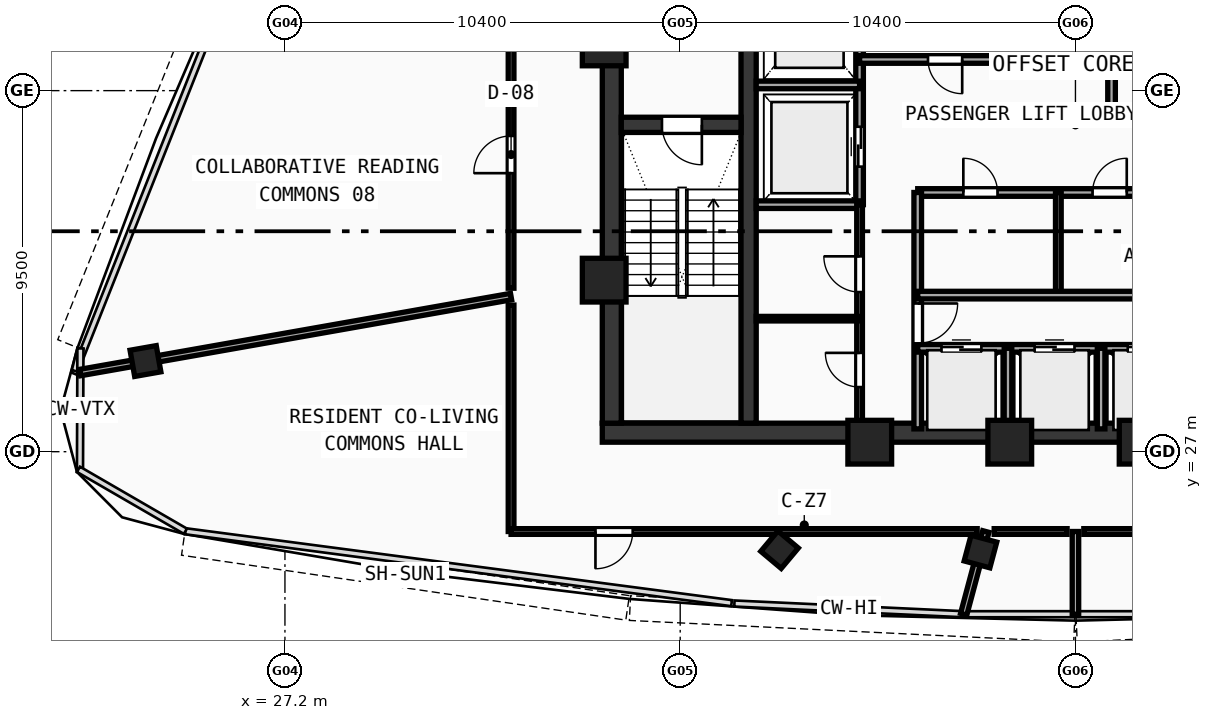
"""IFC4 building model, lengths in metres.
Left out: names, types, materials, properties, quantities, classifications, styles, units other than length and angle.
Written with IfcOpenShell. Run it as: python <this file> out.ifc"""

import sys

from ifc_helpers import new_model, si_unit, direction, frame, frame_2d, origin, origin_with_axes, origin_2d, place, context, subcontext, project, spatial, rectangle, hollow_rectangle, extrude, source, transform, mapped, element, fill, save


model = new_model("IFC4")
c1 = context("Model", 3, precision=1e-05, world=origin(), true_north=direction((0.0, 1.0)))
c2 = subcontext(c1, "Body", "Model", "MODEL_VIEW")
j1 = project(units=[si_unit("LENGTHUNIT", "METRE"), si_unit("PLANEANGLEUNIT", "RADIAN")], contexts=[c1])
p1 = place(None, origin())
s1 = spatial("IfcSite", under=j1, at=p1, CompositionType="ELEMENT")
p2 = place(p1, origin())
s2 = spatial("IfcBuilding", under=s1, at=p2, CompositionType="ELEMENT")
p3 = place(p2, frame((0.0, 0.0, 363.01)))
s3 = spatial("IfcBuildingStorey", under=s2, at=p3, CompositionType="ELEMENT", Elevation=363.01)
p4 = place(p3, frame((35.55, 27.5, 0.0), z_axis=(0.0, 0.0, 1.0), x_axis=(1.0, 0.0, 0.0)))
e1 = element("IfcWall", 1, at=p4, inside=s3, PredefinedType="SHEAR", context=c2, shape_type="SweptSolid", body=[
    extrude(rectangle(XDim=24.9, YDim=0.5, at=frame_2d((12.45, 0.0))), origin(), (0.0, 0.0, 1.0), 3.47),
])
p5 = place(p3, frame((35.8, 27.75, 0.0), z_axis=(0.0, 0.0, 1.0), x_axis=(0.0, 1.0, 0.0)))
e2 = element("IfcWall", 2, at=p5, inside=s3, PredefinedType="SHEAR", context=c2, shape_type="SweptSolid", body=[
    extrude(rectangle(XDim=12.2, YDim=0.5, at=frame_2d((6.1, 0.0))), origin(), (0.0, 0.0, 1.0), 3.47),
])
p6 = place(p3, frame((39.4, 27.75, 0.0), z_axis=(0.0, 0.0, 1.0), x_axis=(0.0, 1.0, 0.0)))
e3 = element("IfcWall", 3, at=p6, inside=s3, PredefinedType="SHEAR", context=c2, shape_type="SweptSolid", body=[
    extrude(rectangle(XDim=12.2, YDim=0.4, at=frame_2d((6.1, 0.0))), origin(), (0.0, 0.0, 1.0), 3.47),
])
p7 = place(p6, frame((10.0, 0.0, 0.0)))
e4 = element("IfcOpeningElement", 4, at=p7, cuts=e3, PredefinedType="OPENING", context=c2, shape_type="SweptSolid", body=[
    extrude(rectangle(XDim=1.1, YDim=2.1, at=frame_2d((0.55, 1.05))), frame((0.0, 0.21, 0.0), z_axis=(0.0, -1.0, 0.0), x_axis=(1.0, 0.0, 0.0)), (0.0, 0.0, 1.0), 0.42),
])
p8 = place(p3, frame((36.05, 35.6, 0.0), z_axis=(0.0, 0.0, 1.0), x_axis=(1.0, 0.0, 0.0)))
e5 = element("IfcWall", 5, at=p8, inside=s3, PredefinedType="SHEAR", context=c2, shape_type="SweptSolid", body=[
    extrude(rectangle(XDim=3.15, YDim=0.4, at=frame_2d((1.575, 0.0))), origin(), (0.0, 0.0, 1.0), 3.47),
])
p9 = place(p8, frame((1.07, 0.0, 0.0)))
e6 = element("IfcOpeningElement", 6, at=p9, cuts=e5, PredefinedType="OPENING", context=c2, shape_type="SweptSolid", body=[
    extrude(rectangle(XDim=1.05, YDim=2.1, at=frame_2d((0.525, 1.05))), frame((0.0, 0.21, 0.0), z_axis=(0.0, -1.0, 0.0), x_axis=(1.0, 0.0, 0.0)), (0.0, 0.0, 1.0), 0.42),
])
m1 = source(origin(), c2, "Body", "SweptSolid", [
    extrude(hollow_rectangle(XDim=1.15, YDim=1.15, WallThickness=0.048, at=origin_2d()), origin(), (0.0, 0.0, 1.0), 3.73),
])
for number, where, z_axis, x_axis in (
    (7, (42.588, 27.25, -0.26), (0.0, 0.0, 1.0), (1.0, 0.0, 0.0)),
    (8, (46.272, 27.25, -0.26), (0.0, 0.0, 1.0), (1.0, 0.0, 0.0)),
    (9, (49.729, 27.25, -0.26), (0.0, 0.0, 1.0), (1.0, 0.0, 0.0)),
    (10, (35.6, 37.729, -0.26), (0.0, 0.0, 1.0), (1.0, 0.0, 0.0)),
    (11, (35.6, 31.513, -0.26), (0.0, 0.0, 1.0), (1.0, 0.0, 0.0)),
):
    element("IfcColumn", number, at=place(p3, frame(where, z_axis=z_axis, x_axis=x_axis)), inside=s3, PredefinedType="COLUMN", context=c2, shape_type="MappedRepresentation", body=[
        mapped(m1, transform((0.0, 0.0, 0.0), scale=1.0)),
    ])
m2 = source(origin(), c2, "Body", "SweptSolid", [
    extrude(hollow_rectangle(XDim=0.7, YDim=0.7, WallThickness=0.026, at=origin_2d()), origin(), (0.0, 0.0, 1.0), 3.73),
])
for number, where, z_axis, x_axis in (
    (12, (40.215, 24.422, -0.26), (0.0, 0.0, 1.0), (0.766, -0.643, 0.0)),
    (13, (45.501, 24.373, -0.26), (0.0, 0.0, 1.0), (0.966, -0.259, 0.0)),
    (14, (23.53, 29.385, -0.26), (0.0, 0.0, 1.0), (0.174, -0.985, 0.0)),
):
    element("IfcColumn", number, at=place(p3, frame(where, z_axis=z_axis, x_axis=x_axis)), inside=s3, PredefinedType="COLUMN", context=c2, shape_type="MappedRepresentation", body=[
        mapped(m2, transform((0.0, 0.0, 0.0), scale=1.0)),
    ])
p10 = place(p3, frame((42.32, 33.5, 0.0), z_axis=(0.0, 0.0, 1.0), x_axis=(0.0, 1.0, 0.0)))
e15 = element("IfcWall", 15, at=p10, inside=s3, PredefinedType="SOLIDWALL", context=c2, shape_type="SweptSolid", body=[
    extrude(rectangle(XDim=6.45, YDim=0.2, at=frame_2d((3.225, 0.0))), origin(), (0.0, 0.0, 1.0), 3.47),
])
p11 = place(p10, frame((1.0, 0.0, 0.0)))
e16 = element("IfcOpeningElement", 16, at=p11, cuts=e15, PredefinedType="OPENING", context=c2, shape_type="SweptSolid", body=[
    extrude(rectangle(XDim=1.05, YDim=2.1, at=frame_2d((0.525, 1.05))), frame((0.0, 0.11, 0.0), z_axis=(0.0, -1.0, 0.0), x_axis=(1.0, 0.0, 0.0)), (0.0, 0.0, 1.0), 0.22),
])
for number, where, z_axis, x_axis in (
    (17, (39.6, 36.65, 0.0), (0.0, 0.0, 1.0), (1.0, 0.0, 0.0)),
    (18, (39.6, 33.5, 0.0), (0.0, 0.0, 1.0), (1.0, 0.0, 0.0)),
):
    element("IfcWall", number, at=place(p3, frame(where, z_axis=z_axis, x_axis=x_axis)), inside=s3, PredefinedType="SOLIDWALL", context=c2, shape_type="SweptSolid", body=[
        extrude(rectangle(XDim=2.72, YDim=0.2, at=frame_2d((1.36, 0.0))), origin(), (0.0, 0.0, 1.0), 3.47),
    ])
p12 = place(p3, frame((42.32, 37.32, 0.0), z_axis=(0.0, 0.0, 1.0), x_axis=(1.0, 0.0, 0.0)))
e19 = element("IfcWall", 19, at=p12, inside=s3, PredefinedType="SOLIDWALL", context=c2, shape_type="SweptSolid", body=[
    extrude(rectangle(XDim=4.73, YDim=0.2, at=frame_2d((2.365, 0.0))), origin(), (0.0, 0.0, 1.0), 3.47),
])
p13 = place(p12, frame((1.8, 0.0, 0.0)))
e20 = element("IfcOpeningElement", 20, at=p13, cuts=e19, PredefinedType="OPENING", context=c2, shape_type="SweptSolid", body=[
    extrude(rectangle(XDim=0.9, YDim=2.1, at=frame_2d((0.45, 1.05))), frame((0.0, 0.11, 0.0), z_axis=(0.0, -1.0, 0.0), x_axis=(1.0, 0.0, 0.0)), (0.0, 0.0, 1.0), 0.22),
])
p14 = place(p3, frame((48.95, 35.85, 0.0), z_axis=(0.0, 0.0, 1.0), x_axis=(1.0, 0.0, 0.0)))
e21 = element("IfcWall", 21, at=p14, inside=s3, PredefinedType="SOLIDWALL", context=c2, shape_type="SweptSolid", body=[
    extrude(rectangle(XDim=4.73, YDim=0.2, at=frame_2d((2.365, 0.0))), origin(), (0.0, 0.0, 1.0), 3.47),
])
p15 = place(p14, frame((1.8, 0.0, 0.0)))
e22 = element("IfcOpeningElement", 22, at=p15, cuts=e21, PredefinedType="OPENING", context=c2, shape_type="SweptSolid", body=[
    extrude(rectangle(XDim=0.9, YDim=2.1, at=frame_2d((0.45, 1.05))), frame((0.0, 0.11, 0.0), z_axis=(0.0, -1.0, 0.0), x_axis=(1.0, 0.0, 0.0)), (0.0, 0.0, 1.0), 0.22),
])
p16 = place(p3, frame((47.05, 37.32, 0.0), z_axis=(0.0, 0.0, 1.0), x_axis=(0.0, 1.0, 0.0)))
e23 = element("IfcWall", 23, at=p16, inside=s3, PredefinedType="SOLIDWALL", context=c2, shape_type="SweptSolid", body=[
    extrude(rectangle(XDim=2.63, YDim=0.2, at=frame_2d((1.315, 0.0))), origin(), (0.0, 0.0, 1.0), 3.47),
])
p17 = place(p3, frame((48.95, 35.85, 0.0), z_axis=(0.0, 0.0, 1.0), x_axis=(0.0, 1.0, 0.0)))
e24 = element("IfcWall", 24, at=p17, inside=s3, PredefinedType="SOLIDWALL", context=c2, shape_type="SweptSolid", body=[
    extrude(rectangle(XDim=4.1, YDim=0.2, at=frame_2d((2.05, 0.0))), origin(), (0.0, 0.0, 1.0), 3.47),
])
p18 = place(p3, frame((43.85, 33.82, 0.0), z_axis=(0.0, 0.0, 1.0), x_axis=(1.0, 0.0, 0.0)))
e25 = element("IfcWall", 25, at=p18, inside=s3, PredefinedType="SOLIDWALL", context=c2, shape_type="SweptSolid", body=[
    extrude(rectangle(XDim=9.83, YDim=0.2, at=frame_2d((4.915, 0.0))), origin(), (0.0, 0.0, 1.0), 3.47),
])
p19 = place(p18, frame((1.2, 0.0, 0.0)))
e26 = element("IfcOpeningElement", 26, at=p19, cuts=e25, PredefinedType="OPENING", context=c2, shape_type="SweptSolid", body=[
    extrude(rectangle(XDim=0.9, YDim=2.1, at=frame_2d((0.45, 1.05))), frame((0.0, 0.11, 0.0), z_axis=(0.0, -1.0, 0.0), x_axis=(1.0, 0.0, 0.0)), (0.0, 0.0, 1.0), 0.22),
])
p20 = place(p18, frame((4.6, 0.0, 0.0)))
e27 = element("IfcOpeningElement", 27, at=p20, cuts=e25, PredefinedType="OPENING", context=c2, shape_type="SweptSolid", body=[
    extrude(rectangle(XDim=0.9, YDim=2.1, at=frame_2d((0.45, 1.05))), frame((0.0, 0.11, 0.0), z_axis=(0.0, -1.0, 0.0), x_axis=(1.0, 0.0, 0.0)), (0.0, 0.0, 1.0), 0.22),
])
p21 = place(p3, frame((43.85, 27.6, 0.0), z_axis=(0.0, 0.0, 1.0), x_axis=(0.0, 1.0, 0.0)))
e28 = element("IfcWall", 28, at=p21, inside=s3, PredefinedType="SOLIDWALL", context=c2, shape_type="SweptSolid", body=[
    extrude(rectangle(XDim=6.22, YDim=0.2, at=frame_2d((3.11, 0.0))), origin(), (0.0, 0.0, 1.0), 3.47),
])
p22 = place(p21, frame((2.25, 0.0, 0.0)))
e29 = element("IfcOpeningElement", 29, at=p22, cuts=e28, PredefinedType="OPENING", context=c2, shape_type="SweptSolid", body=[
    extrude(rectangle(XDim=1.05, YDim=2.1, at=frame_2d((0.525, 1.05))), frame((0.0, 0.11, 0.0), z_axis=(0.0, -1.0, 0.0), x_axis=(1.0, 0.0, 0.0)), (0.0, 0.0, 1.0), 0.22),
])
p23 = place(p3, frame((47.55, 31.12, 0.0), z_axis=(0.0, 0.0, 1.0), x_axis=(0.0, 1.0, 0.0)))
e30 = element("IfcWall", 30, at=p23, inside=s3, PredefinedType="PARTITIONING", context=c2, shape_type="SweptSolid", body=[
    extrude(rectangle(XDim=2.7, YDim=0.15, at=frame_2d((1.35, 0.0))), origin(), (0.0, 0.0, 1.0), 3.47),
])
p24 = place(p3, frame((43.85, 29.72, 0.0), z_axis=(0.0, 0.0, 1.0), x_axis=(1.0, 0.0, 0.0)))
e31 = element("IfcWall", 31, at=p24, inside=s3, PredefinedType="SOLIDWALL", context=c2, shape_type="SweptSolid", body=[
    extrude(rectangle(XDim=7.2, YDim=0.2, at=frame_2d((3.6, 0.0))), origin(), (0.0, 0.0, 1.0), 3.47),
])
p25 = place(p24, frame((0.625, 0.0, 0.0)))
e32 = element("IfcOpeningElement", 32, at=p25, cuts=e31, PredefinedType="OPENING", context=c2, shape_type="SweptSolid", body=[
    extrude(rectangle(XDim=1.05, YDim=2.1, at=frame_2d((0.525, 1.05))), frame((0.0, 0.11, 0.0), z_axis=(0.0, -1.0, 0.0), x_axis=(1.0, 0.0, 0.0)), (0.0, 0.0, 1.0), 0.22),
])
p26 = place(p24, frame((3.075, 0.0, 0.0)))
e33 = element("IfcOpeningElement", 33, at=p26, cuts=e31, PredefinedType="OPENING", context=c2, shape_type="SweptSolid", body=[
    extrude(rectangle(XDim=1.05, YDim=2.1, at=frame_2d((0.525, 1.05))), frame((0.0, 0.11, 0.0), z_axis=(0.0, -1.0, 0.0), x_axis=(1.0, 0.0, 0.0)), (0.0, 0.0, 1.0), 0.22),
])
p27 = place(p24, frame((5.525, 0.0, 0.0)))
e34 = element("IfcOpeningElement", 34, at=p27, cuts=e31, PredefinedType="OPENING", context=c2, shape_type="SweptSolid", body=[
    extrude(rectangle(XDim=1.05, YDim=2.1, at=frame_2d((0.525, 1.05))), frame((0.0, 0.11, 0.0), z_axis=(0.0, -1.0, 0.0), x_axis=(1.0, 0.0, 0.0)), (0.0, 0.0, 1.0), 0.22),
])
p28 = place(p3, frame((43.85, 31.12, 0.0), z_axis=(0.0, 0.0, 1.0), x_axis=(1.0, 0.0, 0.0)))
e35 = element("IfcWall", 35, at=p28, inside=s3, PredefinedType="SOLIDWALL", context=c2, shape_type="SweptSolid", body=[
    extrude(rectangle(XDim=9.83, YDim=0.2, at=frame_2d((4.915, 0.0))), origin(), (0.0, 0.0, 1.0), 3.47),
])
for number, where, z_axis, x_axis in (
    (36, (46.225, 27.6, 0.0), (0.0, 0.0, 1.0), (0.0, 1.0, 0.0)),
    (37, (48.675, 27.6, 0.0), (0.0, 0.0, 1.0), (0.0, 1.0, 0.0)),
):
    element("IfcWall", number, at=place(p3, frame(where, z_axis=z_axis, x_axis=x_axis)), inside=s3, PredefinedType="SOLIDWALL", context=c2, shape_type="SweptSolid", body=[
        extrude(rectangle(XDim=2.12, YDim=0.2, at=frame_2d((1.06, 0.0))), origin(), (0.0, 0.0, 1.0), 3.47),
    ])
p29 = place(p3, frame((42.32, 27.6, 0.0), z_axis=(0.0, 0.0, 1.0), x_axis=(0.0, 1.0, 0.0)))
e38 = element("IfcWall", 38, at=p29, inside=s3, PredefinedType="PARTITIONING", context=c2, shape_type="SweptSolid", body=[
    extrude(rectangle(XDim=5.9, YDim=0.15, at=frame_2d((2.95, 0.0))), origin(), (0.0, 0.0, 1.0), 3.47),
])
p30 = place(p29, frame((1.1, 0.0, 0.0)))
e39 = element("IfcOpeningElement", 39, at=p30, cuts=e38, PredefinedType="OPENING", context=c2, shape_type="SweptSolid", body=[
    extrude(rectangle(XDim=0.9, YDim=2.1, at=frame_2d((0.45, 1.05))), frame((0.0, 0.085, 0.0), z_axis=(0.0, -1.0, 0.0), x_axis=(1.0, 0.0, 0.0)), (0.0, 0.0, 1.0), 0.17),
])
p31 = place(p29, frame((3.6, 0.0, 0.0)))
e40 = element("IfcOpeningElement", 40, at=p31, cuts=e38, PredefinedType="OPENING", context=c2, shape_type="SweptSolid", body=[
    extrude(rectangle(XDim=0.94, YDim=2.1, at=frame_2d((0.47, 1.05))), frame((0.0, 0.085, 0.0), z_axis=(0.0, -1.0, 0.0), x_axis=(1.0, 0.0, 0.0)), (0.0, 0.0, 1.0), 0.17),
])
p32 = place(p3, frame((39.6, 30.5, 0.0), z_axis=(0.0, 0.0, 1.0), x_axis=(1.0, 0.0, 0.0)))
e41 = element("IfcWall", 41, at=p32, inside=s3, PredefinedType="PARTITIONING", context=c2, shape_type="SweptSolid", body=[
    extrude(rectangle(XDim=2.72, YDim=0.12, at=frame_2d((1.36, 0.0))), origin(), (0.0, 0.0, 1.0), 3.47),
])
p33 = place(p3, frame((33.15, 31.082, 0.0), z_axis=(0.0, 0.0, 1.0), x_axis=(-0.984809370591, -0.17363900367, 0.0)))
e42 = element("IfcWall", 42, at=p33, inside=s3, PredefinedType="PARTITIONING", context=c2, shape_type="SweptSolid", body=[
    extrude(rectangle(XDim=11.517, YDim=0.17, at=frame_2d((5.758, 0.0))), origin(), (0.0, 0.0, 1.0), 2.87),
])
p34 = place(p3, frame((45.642, 24.9, 0.0), z_axis=(0.0, 0.0, 1.0), x_axis=(-0.258842593831, -0.965919516119, 0.0)))
e43 = element("IfcWall", 43, at=p34, inside=s3, PredefinedType="PARTITIONING", context=c2, shape_type="SweptSolid", body=[
    extrude(rectangle(XDim=2.253, YDim=0.17, at=frame_2d((1.127, 0.0))), origin(), (0.0, 0.0, 1.0), 2.87),
])
p35 = place(p3, frame((48.0, 24.9, 0.0), z_axis=(0.0, 0.0, 1.0), x_axis=(0.0, -1.0, 0.0)))
e44 = element("IfcWall", 44, at=p35, inside=s3, PredefinedType="PARTITIONING", context=c2, shape_type="SweptSolid", body=[
    extrude(rectangle(XDim=2.177, YDim=0.17, at=frame_2d((1.088, 0.0))), origin(), (0.0, 0.0, 1.0), 2.87),
])
p36 = place(p3, frame((33.15, 24.9, 0.0), z_axis=(0.0, 0.0, 1.0), x_axis=(0.0, 1.0, 0.0)))
e45 = element("IfcWall", 45, at=p36, inside=s3, PredefinedType="PARTITIONING", context=c2, shape_type="SweptSolid", body=[
    extrude(rectangle(XDim=5.958, YDim=0.15, at=frame_2d((2.979, 0.0))), origin(), (0.0, 0.0, 1.0), 2.87),
])
p37 = place(p3, frame((33.15, 31.301, 0.0), z_axis=(0.0, 0.0, 1.0), x_axis=(0.0, 1.0, 0.0)))
e46 = element("IfcWall", 46, at=p37, inside=s3, PredefinedType="PARTITIONING", context=c2, shape_type="SweptSolid", body=[
    extrude(rectangle(XDim=7.004, YDim=0.15, at=frame_2d((3.502, 0.0))), origin(), (0.0, 0.0, 1.0), 3.47),
])
p38 = place(p37, frame((3.027, 0.0, 0.0)))
e47 = element("IfcOpeningElement", 47, at=p38, cuts=e46, PredefinedType="OPENING", context=c2, shape_type="SweptSolid", body=[
    extrude(rectangle(XDim=0.98, YDim=2.12, at=frame_2d((0.49, 1.06))), frame((0.0, 0.085, 0.0), z_axis=(0.0, -1.0, 0.0), x_axis=(1.0, 0.0, 0.0)), (0.0, 0.0, 1.0), 0.17),
])
for number, where, z_axis, x_axis in (
    (48, (50.138, 24.9, 0.0), (0.0, 0.0, 1.0), (-1.0, 0.0, 0.0)),
    (49, (47.78, 24.9, 0.0), (0.0, 0.0, 1.0), (-1.0, 0.0, 0.0)),
):
    element("IfcWall", number, at=place(p3, frame(where, z_axis=z_axis, x_axis=x_axis)), inside=s3, PredefinedType="PARTITIONING", context=c2, shape_type="SweptSolid", body=[
        extrude(rectangle(XDim=1.918, YDim=0.15, at=frame_2d((0.959, 0.0))), origin(), (0.0, 0.0, 1.0), 3.47),
    ])
p39 = place(p3, frame((45.414, 24.9, 0.0), z_axis=(0.0, 0.0, 1.0), x_axis=(-1.0, 0.0, 0.0)))
e50 = element("IfcWall", 50, at=p39, inside=s3, PredefinedType="PARTITIONING", context=c2, shape_type="SweptSolid", body=[
    extrude(rectangle(XDim=12.264, YDim=0.15, at=frame_2d((6.132, 0.0))), origin(), (0.0, 0.0, 1.0), 2.87),
])
p40 = place(p39, frame((9.064, 0.0, 0.0)))
e51 = element("IfcOpeningElement", 51, at=p40, cuts=e50, PredefinedType="OPENING", context=c2, shape_type="SweptSolid", body=[
    extrude(rectangle(XDim=0.98, YDim=2.12, at=frame_2d((0.49, 1.06))), frame((0.0, 0.085, 0.0), z_axis=(0.0, -1.0, 0.0), x_axis=(1.0, 0.0, 0.0)), (0.0, 0.0, 1.0), 0.17),
])
m3 = source(origin(), c2, "Body", "SweptSolid", [
    extrude(rectangle(XDim=1.05, YDim=2.1, at=frame_2d((0.525, 1.05))), frame((0.0, 0.025, 0.0), z_axis=(0.0, -1.0, 0.0), x_axis=(1.0, 0.0, 0.0)), (0.0, 0.0, 1.0), 0.05),
])
p41 = place(p9, frame((1.05, 0.0, 0.0), z_axis=(0.0, 0.0, 1.0), x_axis=(-1.0, 0.0, 0.0)))
e52 = element("IfcDoor", 52, at=p41, inside=s3, OperationType="SINGLE_SWING_LEFT", PredefinedType="DOOR", context=c2, shape_type="MappedRepresentation", body=[
    mapped(m3, transform((0.0, 0.0, 0.0), scale=1.0)),
])
fill(e6, e52)
p42 = place(p11, origin_with_axes())
e53 = element("IfcDoor", 53, at=p42, inside=s3, OperationType="DOUBLE_DOOR_SLIDING", PredefinedType="DOOR", context=c2, shape_type="MappedRepresentation", body=[
    mapped(m3, transform((0.0, 0.0, 0.0), scale=1.0)),
])
fill(e16, e53)
m4 = source(origin(), c2, "Body", "SweptSolid", [
    extrude(rectangle(XDim=0.9, YDim=2.1, at=frame_2d((0.45, 1.05))), frame((0.0, 0.025, 0.0), z_axis=(0.0, -1.0, 0.0), x_axis=(1.0, 0.0, 0.0)), (0.0, 0.0, 1.0), 0.05),
])
p43 = place(p13, frame((0.9, 0.0, 0.0), z_axis=(0.0, 0.0, 1.0), x_axis=(-1.0, 0.0, 0.0)))
e54 = element("IfcDoor", 54, at=p43, inside=s3, OperationType="SINGLE_SWING_LEFT", PredefinedType="DOOR", context=c2, shape_type="MappedRepresentation", body=[
    mapped(m4, transform((0.0, 0.0, 0.0), scale=1.0)),
])
fill(e20, e54)
p44 = place(p19, origin_with_axes())
e55 = element("IfcDoor", 55, at=p44, inside=s3, OperationType="SINGLE_SWING_LEFT", PredefinedType="DOOR", context=c2, shape_type="MappedRepresentation", body=[
    mapped(m4, transform((0.0, 0.0, 0.0), scale=1.0)),
])
fill(e26, e55)
p45 = place(p20, origin_with_axes())
e56 = element("IfcDoor", 56, at=p45, inside=s3, OperationType="SINGLE_SWING_RIGHT", PredefinedType="DOOR", context=c2, shape_type="MappedRepresentation", body=[
    mapped(m4, transform((0.0, 0.0, 0.0), scale=1.0)),
])
fill(e27, e56)
p46 = place(p22, frame((1.05, 0.0, 0.0), z_axis=(0.0, 0.0, 1.0), x_axis=(-1.0, 0.0, 0.0)))
e57 = element("IfcDoor", 57, at=p46, inside=s3, OperationType="SINGLE_SWING_LEFT", PredefinedType="DOOR", context=c2, shape_type="MappedRepresentation", body=[
    mapped(m3, transform((0.0, 0.0, 0.0), scale=1.0)),
])
fill(e29, e57)
p47 = place(p25, origin_with_axes())
e58 = element("IfcDoor", 58, at=p47, inside=s3, OperationType="DOUBLE_DOOR_SLIDING", PredefinedType="DOOR", context=c2, shape_type="MappedRepresentation", body=[
    mapped(m3, transform((0.0, 0.0, 0.0), scale=1.0)),
])
fill(e32, e58)
p48 = place(p26, origin_with_axes())
e59 = element("IfcDoor", 59, at=p48, inside=s3, OperationType="DOUBLE_DOOR_SLIDING", PredefinedType="DOOR", context=c2, shape_type="MappedRepresentation", body=[
    mapped(m3, transform((0.0, 0.0, 0.0), scale=1.0)),
])
fill(e33, e59)
p49 = place(p27, origin_with_axes())
e60 = element("IfcDoor", 60, at=p49, inside=s3, OperationType="DOUBLE_DOOR_SLIDING", PredefinedType="DOOR", context=c2, shape_type="MappedRepresentation", body=[
    mapped(m3, transform((0.0, 0.0, 0.0), scale=1.0)),
])
fill(e34, e60)
p50 = place(p30, origin_with_axes())
e61 = element("IfcDoor", 61, at=p50, inside=s3, OperationType="SINGLE_SWING_RIGHT", PredefinedType="DOOR", context=c2, shape_type="MappedRepresentation", body=[
    mapped(m4, transform((0.0, 0.0, 0.0), scale=1.0)),
])
fill(e39, e61)
m5 = source(origin(), c2, "Body", "SweptSolid", [
    extrude(rectangle(XDim=0.94, YDim=2.1, at=frame_2d((0.47, 1.05))), frame((0.0, 0.025, 0.0), z_axis=(0.0, -1.0, 0.0), x_axis=(1.0, 0.0, 0.0)), (0.0, 0.0, 1.0), 0.05),
])
p51 = place(p31, origin_with_axes())
e62 = element("IfcDoor", 62, at=p51, inside=s3, OperationType="SINGLE_SWING_RIGHT", PredefinedType="DOOR", context=c2, shape_type="MappedRepresentation", body=[
    mapped(m5, transform((0.0, 0.0, 0.0), scale=1.0)),
])
fill(e40, e62)
m6 = source(origin(), c2, "Body", "SweptSolid", [
    extrude(rectangle(XDim=0.98, YDim=2.12, at=frame_2d((0.49, 1.06))), frame((0.0, 0.025, 0.0), z_axis=(0.0, -1.0, 0.0), x_axis=(1.0, 0.0, 0.0)), (0.0, 0.0, 1.0), 0.05),
])
p52 = place(p38, origin_with_axes())
e63 = element("IfcDoor", 63, at=p52, inside=s3, OperationType="SINGLE_SWING_LEFT", PredefinedType="DOOR", context=c2, shape_type="MappedRepresentation", body=[
    mapped(m6, transform((0.0, 0.0, 0.0), scale=1.0)),
])
fill(e47, e63)
p53 = place(p40, origin_with_axes())
e64 = element("IfcDoor", 64, at=p53, inside=s3, OperationType="SINGLE_SWING_RIGHT", PredefinedType="DOOR", context=c2, shape_type="MappedRepresentation", body=[
    mapped(m6, transform((0.0, 0.0, 0.0), scale=1.0)),
])
fill(e51, e64)
save(model, sys.argv[1])
